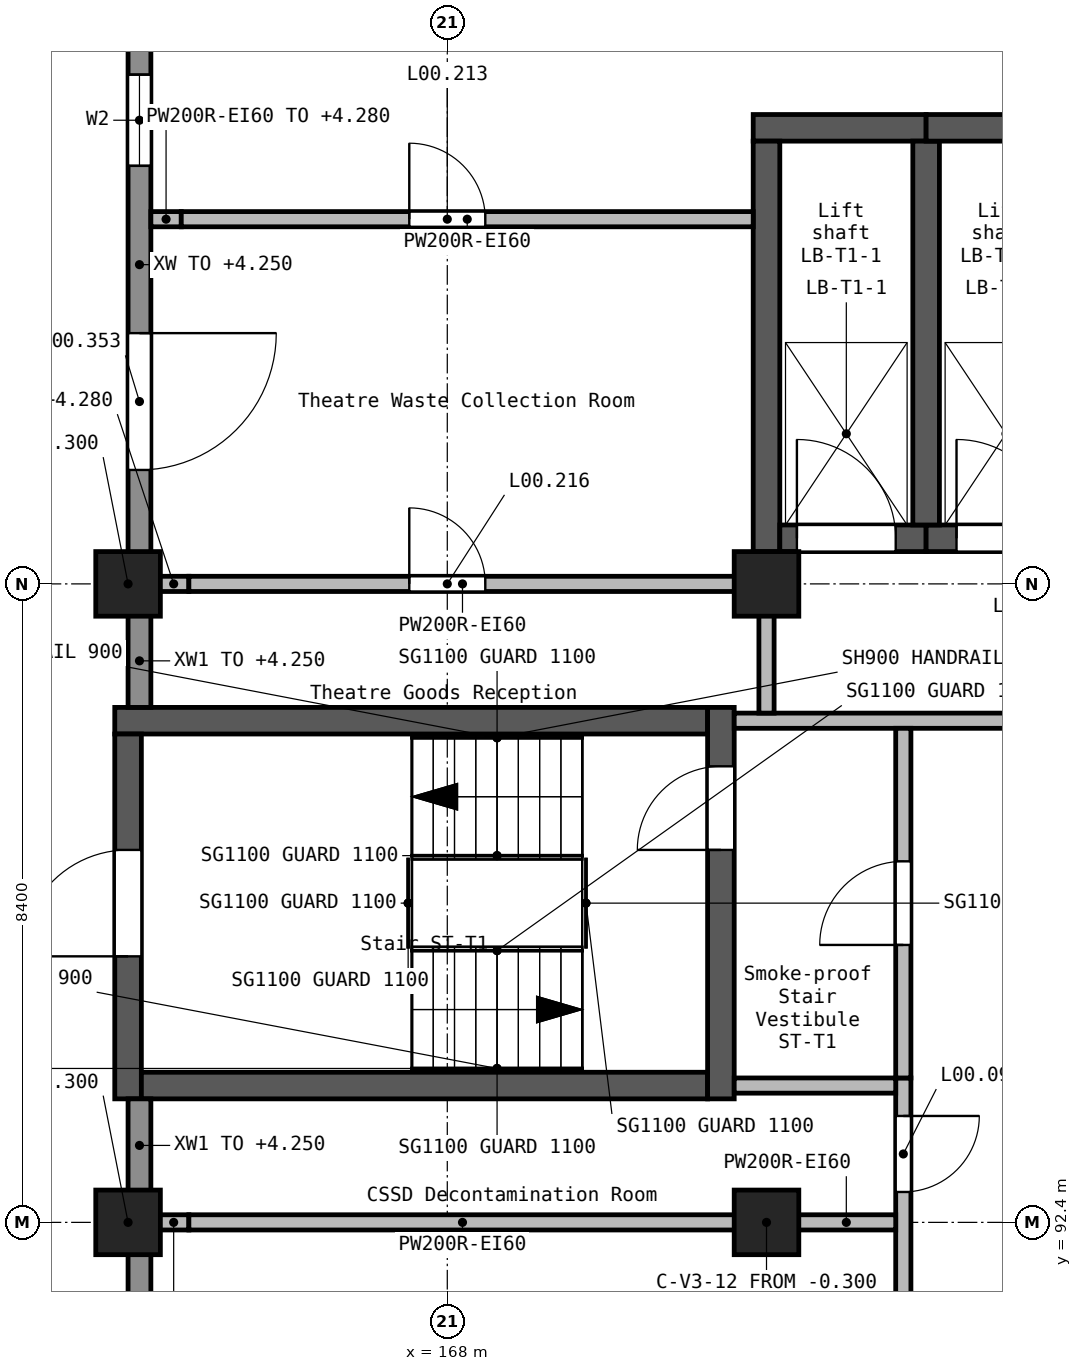
"""IFC4 building model, lengths in metres.
Left out: names, types, materials, properties, quantities, classifications, styles, units other than length and angle.
Written with IfcOpenShell. Run it as: python <this file> out.ifc"""

import sys

from ifc_helpers import new_model, si_unit, direction, frame, frame_2d, origin, origin_2d, place, context, subcontext, project, spatial, rectangle, extrude, element, fill, save


model = new_model("IFC4")
c1 = context("Model", 3, precision=1e-05, world=origin(), true_north=direction((0.0, 1.0)))
c2 = subcontext(c1, "Body", "Model", "MODEL_VIEW")
j1 = project(units=[si_unit("LENGTHUNIT", "METRE"), si_unit("PLANEANGLEUNIT", "RADIAN")], contexts=[c1])
p1 = place(None, origin())
s1 = spatial("IfcSite", under=j1, at=p1, CompositionType="ELEMENT")
p2 = place(p1, origin())
s2 = spatial("IfcBuilding", under=s1, at=p2, CompositionType="ELEMENT")
p3 = place(p2, origin())
s3 = spatial("IfcBuildingStorey", under=s2, at=p3, CompositionType="ELEMENT", Elevation=0.0)
for number, where, z_axis, x_axis in (
    (1, (163.8, 92.4, -0.3), (0.0, 0.0, 1.0), (1.0, 0.0, 0.0)),
    (2, (163.8, 100.8, -0.3), (0.0, 0.0, 1.0), (1.0, 0.0, 0.0)),
    (3, (172.2, 92.4, -0.3), (0.0, 0.0, 1.0), (1.0, 0.0, 0.0)),
    (4, (172.2, 100.8, -0.3), (0.0, 0.0, 1.0), (1.0, 0.0, 0.0)),
):
    element("IfcColumn", number, at=place(p3, frame(where, z_axis=z_axis, x_axis=x_axis)), inside=s3, PredefinedType="COLUMN", context=c2, shape_type="SweptSolid", body=[
        extrude(rectangle(XDim=0.85, YDim=0.85, at=origin_2d()), origin(), (0.0, 0.0, 1.0), 5.7),
    ])
p4 = place(p3, frame((163.625, 99.0, -0.3), z_axis=(0.0, 0.0, 1.0), x_axis=(1.0, 0.0, 0.0)))
e5 = element("IfcWall", 5, at=p4, inside=s3, PredefinedType="SHEAR", context=c2, shape_type="SweptSolid", body=[
    extrude(rectangle(XDim=7.8, YDim=0.35, at=frame_2d((3.9, 0.0))), origin(), (0.0, 0.0, 1.0), 5.7),
])
p5 = place(p3, frame((163.8, 94.025, -0.3), z_axis=(0.0, 0.0, 1.0), x_axis=(0.0, 1.0, 0.0)))
e6 = element("IfcWall", 6, at=p5, inside=s3, PredefinedType="SHEAR", context=c2, shape_type="SweptSolid", body=[
    extrude(rectangle(XDim=4.8, YDim=0.35, at=frame_2d((2.4, 0.0))), origin(), (0.0, 0.0, 1.0), 5.7),
])
p6 = place(p5, frame((1.875, 0.0, 0.3)))
e7 = element("IfcOpeningElement", 7, at=p6, cuts=e6, PredefinedType="OPENING", context=c2, shape_type="SweptSolid", body=[
    extrude(rectangle(XDim=1.4, YDim=2.1, at=frame_2d((0.7, 1.05))), frame((0.0, 0.185, 0.0), z_axis=(0.0, -1.0, 0.0), x_axis=(1.0, 0.0, 0.0)), (0.0, 0.0, 1.0), 0.37),
])
p7 = place(p3, frame((163.975, 94.2, -0.3), z_axis=(0.0, 0.0, 1.0), x_axis=(1.0, 0.0, 0.0)))
e8 = element("IfcWall", 8, at=p7, inside=s3, PredefinedType="SHEAR", context=c2, shape_type="SweptSolid", body=[
    extrude(rectangle(XDim=7.45, YDim=0.35, at=frame_2d((3.725, 0.0))), origin(), (0.0, 0.0, 1.0), 5.7),
])
p8 = place(p3, frame((171.6, 94.025, -0.3), z_axis=(0.0, 0.0, 1.0), x_axis=(0.0, 1.0, 0.0)))
e9 = element("IfcWall", 9, at=p8, inside=s3, PredefinedType="SHEAR", context=c2, shape_type="SweptSolid", body=[
    extrude(rectangle(XDim=5.15, YDim=0.35, at=frame_2d((2.575, 0.0))), origin(), (0.0, 0.0, 1.0), 5.7),
])
p9 = place(p8, frame((3.275, 0.0, 0.3)))
e10 = element("IfcOpeningElement", 10, at=p9, cuts=e9, PredefinedType="OPENING", context=c2, shape_type="SweptSolid", body=[
    extrude(rectangle(XDim=1.1, YDim=2.1, at=frame_2d((0.55, 1.05))), frame((0.0, 0.185, 0.0), z_axis=(0.0, -1.0, 0.0), x_axis=(1.0, 0.0, 0.0)), (0.0, 0.0, 1.0), 0.37),
])
p10 = place(p3, frame((172.025, 106.8, -0.3), z_axis=(0.0, 0.0, 1.0), x_axis=(1.0, 0.0, 0.0)))
e11 = element("IfcWall", 11, at=p10, inside=s3, PredefinedType="SHEAR", context=c2, shape_type="SweptSolid", body=[
    extrude(rectangle(XDim=2.275, YDim=0.35, at=frame_2d((1.138, 0.0))), origin(), (0.0, 0.0, 1.0), 5.7),
])
p11 = place(p3, frame((172.2, 101.225, -0.3), z_axis=(0.0, 0.0, 1.0), x_axis=(0.0, 1.0, 0.0)))
e12 = element("IfcWall", 12, at=p11, inside=s3, PredefinedType="SHEAR", context=c2, shape_type="SweptSolid", body=[
    extrude(rectangle(XDim=5.4, YDim=0.35, at=frame_2d((2.7, 0.0))), origin(), (0.0, 0.0, 1.0), 5.7),
])
p12 = place(p3, frame((172.375, 101.4, -0.3), z_axis=(0.0, 0.0, 1.0), x_axis=(1.0, 0.0, 0.0)))
e13 = element("IfcWall", 13, at=p12, inside=s3, PredefinedType="SHEAR", context=c2, shape_type="SweptSolid", body=[
    extrude(rectangle(XDim=1.925, YDim=0.35, at=frame_2d((0.962, 0.0))), origin(), (0.0, 0.0, 1.0), 5.7),
])
p13 = place(p12, frame((0.225, 0.0, 0.3)))
e14 = element("IfcOpeningElement", 14, at=p13, cuts=e13, PredefinedType="OPENING", context=c2, shape_type="SweptSolid", body=[
    extrude(rectangle(XDim=1.3, YDim=2.1, at=frame_2d((0.65, 1.05))), frame((0.0, 0.185, 0.0), z_axis=(0.0, -1.0, 0.0), x_axis=(1.0, 0.0, 0.0)), (0.0, 0.0, 1.0), 0.37),
])
p14 = place(p3, frame((174.3, 101.4, -0.3), z_axis=(0.0, 0.0, 1.0), x_axis=(1.0, 0.0, 0.0)))
e15 = element("IfcWall", 15, at=p14, inside=s3, PredefinedType="SHEAR", context=c2, shape_type="SweptSolid", body=[
    extrude(rectangle(XDim=2.1, YDim=0.35, at=frame_2d((1.05, 0.0))), origin(), (0.0, 0.0, 1.0), 5.7),
])
p15 = place(p14, frame((0.4, 0.0, 0.3)))
e16 = element("IfcOpeningElement", 16, at=p15, cuts=e15, PredefinedType="OPENING", context=c2, shape_type="SweptSolid", body=[
    extrude(rectangle(XDim=1.3, YDim=2.1, at=frame_2d((0.65, 1.05))), frame((0.0, 0.185, 0.0), z_axis=(0.0, -1.0, 0.0), x_axis=(1.0, 0.0, 0.0)), (0.0, 0.0, 1.0), 0.37),
])
p16 = place(p3, frame((174.3, 101.575, -0.3), z_axis=(0.0, 0.0, 1.0), x_axis=(0.0, 1.0, 0.0)))
e17 = element("IfcWall", 17, at=p16, inside=s3, PredefinedType="SHEAR", context=c2, shape_type="SweptSolid", body=[
    extrude(rectangle(XDim=5.05, YDim=0.35, at=frame_2d((2.525, 0.0))), origin(), (0.0, 0.0, 1.0), 5.7),
])
p17 = place(p3, frame((174.3, 106.8, -0.3), z_axis=(0.0, 0.0, 1.0), x_axis=(1.0, 0.0, 0.0)))
e18 = element("IfcWall", 18, at=p17, inside=s3, PredefinedType="SHEAR", context=c2, shape_type="SweptSolid", body=[
    extrude(rectangle(XDim=2.1, YDim=0.35, at=frame_2d((1.05, 0.0))), origin(), (0.0, 0.0, 1.0), 5.7),
])
p18 = place(p3, frame((163.95, 108.8, 0.0), z_axis=(0.0, 0.0, 1.0), x_axis=(0.0, -1.0, 0.0)))
e19 = element("IfcWall", 19, at=p18, inside=s3, PredefinedType="STANDARD", context=c2, shape_type="SweptSolid", body=[
    extrude(rectangle(XDim=7.6, YDim=0.3, at=frame_2d((3.8, 0.0))), origin(), (0.0, 0.0, 1.0), 4.25),
])
p19 = place(p18, frame((4.701, 0.0, 0.0)))
e20 = element("IfcOpeningElement", 20, at=p19, cuts=e19, PredefinedType="OPENING", context=c2, shape_type="SweptSolid", body=[
    extrude(rectangle(XDim=1.8, YDim=2.1, at=frame_2d((0.9, 1.05))), frame((0.0, 0.16, 0.0), z_axis=(0.0, -1.0, 0.0), x_axis=(1.0, 0.0, 0.0)), (0.0, 0.0, 1.0), 0.32),
])
p20 = place(p18, frame((1.3, 0.0, 1.2)))
e21 = element("IfcOpeningElement", 21, at=p20, cuts=e19, PredefinedType="OPENING", context=c2, shape_type="SweptSolid", body=[
    extrude(rectangle(XDim=1.2, YDim=1.2, at=frame_2d((0.6, 0.6))), frame((0.0, 0.16, 0.0), z_axis=(0.0, -1.0, 0.0), x_axis=(1.0, 0.0, 0.0)), (0.0, 0.0, 1.0), 0.32),
])
for number, where, z_axis, x_axis in (
    (22, (163.95, 100.4, 0.0), (0.0, 0.0, 1.0), (0.0, -1.0, 0.0)),
    (23, (163.95, 94.025, 0.0), (0.0, 0.0, 1.0), (0.0, -1.0, 0.0)),
):
    element("IfcWall", number, at=place(p3, frame(where, z_axis=z_axis, x_axis=x_axis)), inside=s3, PredefinedType="STANDARD", context=c2, shape_type="SweptSolid", body=[
        extrude(rectangle(XDim=1.225, YDim=0.3, at=frame_2d((0.612, 0.0))), origin(), (0.0, 0.0, 1.0), 4.25),
    ])
p21 = place(p3, frame((163.95, 92.0, 0.0), z_axis=(0.0, 0.0, 1.0), x_axis=(0.0, -1.0, 0.0)))
e24 = element("IfcWall", 24, at=p21, inside=s3, PredefinedType="STANDARD", context=c2, shape_type="SweptSolid", body=[
    extrude(rectangle(XDim=7.6, YDim=0.3, at=frame_2d((3.8, 0.0))), origin(), (0.0, 0.0, 1.0), 4.25),
])
p22 = place(p21, frame((1.3, 0.0, 1.2)))
e25 = element("IfcOpeningElement", 25, at=p22, cuts=e24, PredefinedType="OPENING", context=c2, shape_type="SweptSolid", body=[
    extrude(rectangle(XDim=1.2, YDim=1.2, at=frame_2d((0.6, 0.6))), frame((0.0, 0.16, 0.0), z_axis=(0.0, -1.0, 0.0), x_axis=(1.0, 0.0, 0.0)), (0.0, 0.0, 1.0), 0.32),
])
p23 = place(p21, frame((5.75, 0.0, 1.2)))
e26 = element("IfcOpeningElement", 26, at=p23, cuts=e24, PredefinedType="OPENING", context=c2, shape_type="SweptSolid", body=[
    extrude(rectangle(XDim=1.2, YDim=1.2, at=frame_2d((0.6, 0.6))), frame((0.0, 0.16, 0.0), z_axis=(0.0, -1.0, 0.0), x_axis=(1.0, 0.0, 0.0)), (0.0, 0.0, 1.0), 0.32),
])
p24 = place(p3, frame((174.0, 94.3, 0.0), z_axis=(0.0, 0.0, 1.0), x_axis=(0.0, -1.0, 0.0)))
e27 = element("IfcWall", 27, at=p24, inside=s3, PredefinedType="SOLIDWALL", context=c2, shape_type="SweptSolid", body=[
    extrude(rectangle(XDim=10.4, YDim=0.2, at=frame_2d((5.2, 0.0))), origin(), (0.0, 0.0, 1.0), 5.05),
])
p25 = place(p24, frame((0.5, 0.0, 0.0)))
e28 = element("IfcOpeningElement", 28, at=p25, cuts=e27, PredefinedType="OPENING", context=c2, shape_type="SweptSolid", body=[
    extrude(rectangle(XDim=1.0, YDim=2.1, at=frame_2d((0.5, 1.05))), frame((0.0, 0.11, 0.0), z_axis=(0.0, -1.0, 0.0), x_axis=(1.0, 0.0, 0.0)), (0.0, 0.0, 1.0), 0.22),
])
p26 = place(p24, frame((4.4, 0.0, 0.0)))
e29 = element("IfcOpeningElement", 29, at=p26, cuts=e27, PredefinedType="OPENING", context=c2, shape_type="SweptSolid", body=[
    extrude(rectangle(XDim=1.0, YDim=2.1, at=frame_2d((0.5, 1.05))), frame((0.0, 0.11, 0.0), z_axis=(0.0, -1.0, 0.0), x_axis=(1.0, 0.0, 0.0)), (0.0, 0.0, 1.0), 0.22),
])
p27 = place(p24, frame((8.6, 0.0, 0.0)))
e30 = element("IfcOpeningElement", 30, at=p27, cuts=e27, PredefinedType="OPENING", context=c2, shape_type="SweptSolid", body=[
    extrude(rectangle(XDim=1.0, YDim=2.1, at=frame_2d((0.5, 1.05))), frame((0.0, 0.11, 0.0), z_axis=(0.0, -1.0, 0.0), x_axis=(1.0, 0.0, 0.0)), (0.0, 0.0, 1.0), 0.22),
])
p28 = place(p3, frame((164.2, 92.4, 0.0), z_axis=(0.0, 0.0, 1.0), x_axis=(1.0, 0.0, 0.0)))
e31 = element("IfcWall", 31, at=p28, inside=s3, PredefinedType="SOLIDWALL", context=c2, shape_type="SweptSolid", body=[
    extrude(rectangle(XDim=0.4, YDim=0.2, at=frame_2d((0.2, 0.0))), origin(), (0.0, 0.0, 1.0), 4.28),
])
p29 = place(p3, frame((164.6, 92.4, 0.0), z_axis=(0.0, 0.0, 1.0), x_axis=(1.0, 0.0, 0.0)))
e32 = element("IfcWall", 32, at=p29, inside=s3, PredefinedType="SOLIDWALL", context=c2, shape_type="SweptSolid", body=[
    extrude(rectangle(XDim=7.2, YDim=0.2, at=frame_2d((3.6, 0.0))), origin(), (0.0, 0.0, 1.0), 5.05),
])
p30 = place(p3, frame((172.6, 92.4, 0.0), z_axis=(0.0, 0.0, 1.0), x_axis=(1.0, 0.0, 0.0)))
e33 = element("IfcWall", 33, at=p30, inside=s3, PredefinedType="SOLIDWALL", context=c2, shape_type="SweptSolid", body=[
    extrude(rectangle(XDim=1.3, YDim=0.2, at=frame_2d((0.65, 0.0))), origin(), (0.0, 0.0, 1.0), 5.05),
])
p31 = place(p3, frame((180.7, 99.0, 0.0), z_axis=(0.0, 0.0, 1.0), x_axis=(-1.0, 0.0, 0.0)))
e34 = element("IfcWall", 34, at=p31, inside=s3, PredefinedType="SOLIDWALL", context=c2, shape_type="SweptSolid", body=[
    extrude(rectangle(XDim=8.925, YDim=0.2, at=frame_2d((4.462, 0.0))), origin(), (0.0, 0.0, 1.0), 5.05),
])
p32 = place(p31, frame((2.5, 0.0, 0.0)))
e35 = element("IfcOpeningElement", 35, at=p32, cuts=e34, PredefinedType="OPENING", context=c2, shape_type="SweptSolid", body=[
    extrude(rectangle(XDim=1.8, YDim=2.1, at=frame_2d((0.9, 1.05))), frame((0.0, 0.11, 0.0), z_axis=(0.0, -1.0, 0.0), x_axis=(1.0, 0.0, 0.0)), (0.0, 0.0, 1.0), 0.22),
])
p33 = place(p3, frame((172.2, 99.1, 0.0), z_axis=(0.0, 0.0, 1.0), x_axis=(0.0, 1.0, 0.0)))
e36 = element("IfcWall", 36, at=p33, inside=s3, PredefinedType="SOLIDWALL", context=c2, shape_type="SweptSolid", body=[
    extrude(rectangle(XDim=1.3, YDim=0.2, at=frame_2d((0.65, 0.0))), origin(), (0.0, 0.0, 1.0), 5.05),
])
p34 = place(p3, frame((164.2, 100.8, 0.0), z_axis=(0.0, 0.0, 1.0), x_axis=(1.0, 0.0, 0.0)))
e37 = element("IfcWall", 37, at=p34, inside=s3, PredefinedType="SOLIDWALL", context=c2, shape_type="SweptSolid", body=[
    extrude(rectangle(XDim=0.4, YDim=0.2, at=frame_2d((0.2, 0.0))), origin(), (0.0, 0.0, 1.0), 4.28),
])
p35 = place(p3, frame((164.6, 100.8, 0.0), z_axis=(0.0, 0.0, 1.0), x_axis=(1.0, 0.0, 0.0)))
e38 = element("IfcWall", 38, at=p35, inside=s3, PredefinedType="SOLIDWALL", context=c2, shape_type="SweptSolid", body=[
    extrude(rectangle(XDim=7.2, YDim=0.2, at=frame_2d((3.6, 0.0))), origin(), (0.0, 0.0, 1.0), 5.05),
])
p36 = place(p35, frame((2.9, 0.0, 0.0)))
e39 = element("IfcOpeningElement", 39, at=p36, cuts=e38, PredefinedType="OPENING", context=c2, shape_type="SweptSolid", body=[
    extrude(rectangle(XDim=1.0, YDim=2.1, at=frame_2d((0.5, 1.05))), frame((0.0, 0.11, 0.0), z_axis=(0.0, -1.0, 0.0), x_axis=(1.0, 0.0, 0.0)), (0.0, 0.0, 1.0), 0.22),
])
p37 = place(p3, frame((164.1, 105.598, 0.0), z_axis=(0.0, 0.0, 1.0), x_axis=(1.0, 0.0, 0.0)))
e40 = element("IfcWall", 40, at=p37, inside=s3, PredefinedType="SOLIDWALL", context=c2, shape_type="SweptSolid", body=[
    extrude(rectangle(XDim=0.4, YDim=0.2, at=frame_2d((0.2, 0.0))), origin(), (0.0, 0.0, 1.0), 4.28),
])
p38 = place(p3, frame((164.5, 105.598, 0.0), z_axis=(0.0, 0.0, 1.0), x_axis=(1.0, 0.0, 0.0)))
e41 = element("IfcWall", 41, at=p38, inside=s3, PredefinedType="SOLIDWALL", context=c2, shape_type="SweptSolid", body=[
    extrude(rectangle(XDim=7.525, YDim=0.2, at=frame_2d((3.762, 0.0))), origin(), (0.0, 0.0, 1.0), 5.05),
])
p39 = place(p38, frame((3.0, 0.0, 0.0)))
e42 = element("IfcOpeningElement", 42, at=p39, cuts=e41, PredefinedType="OPENING", context=c2, shape_type="SweptSolid", body=[
    extrude(rectangle(XDim=1.0, YDim=2.1, at=frame_2d((0.5, 1.05))), frame((0.0, 0.11, 0.0), z_axis=(0.0, -1.0, 0.0), x_axis=(1.0, 0.0, 0.0)), (0.0, 0.0, 1.0), 0.22),
])
p40 = place(p3, frame((174.0, 94.3, 0.0), z_axis=(0.0, 0.0, 1.0), x_axis=(0.0, 1.0, 0.0)))
e43 = element("IfcWall", 43, at=p40, inside=s3, PredefinedType="SOLIDWALL", context=c2, shape_type="SweptSolid", body=[
    extrude(rectangle(XDim=4.6, YDim=0.2, at=frame_2d((2.3, 0.0))), origin(), (0.0, 0.0, 1.0), 5.05),
])
p41 = place(p40, frame((1.75, 0.0, 0.0)))
e44 = element("IfcOpeningElement", 44, at=p41, cuts=e43, PredefinedType="OPENING", context=c2, shape_type="SweptSolid", body=[
    extrude(rectangle(XDim=1.1, YDim=2.1, at=frame_2d((0.55, 1.05))), frame((0.0, 0.11, 0.0), z_axis=(0.0, -1.0, 0.0), x_axis=(1.0, 0.0, 0.0)), (0.0, 0.0, 1.0), 0.22),
])
p42 = place(p3, frame((171.775, 94.2, 0.0), z_axis=(0.0, 0.0, 1.0), x_axis=(1.0, 0.0, 0.0)))
e45 = element("IfcWall", 45, at=p42, inside=s3, PredefinedType="SOLIDWALL", context=c2, shape_type="SweptSolid", body=[
    extrude(rectangle(XDim=2.125, YDim=0.2, at=frame_2d((1.062, 0.0))), origin(), (0.0, 0.0, 1.0), 5.05),
])
p43 = place(p6, origin())
e46 = element("IfcDoor", 46, at=p43, inside=s3, OperationType="SINGLE_SWING_LEFT", PredefinedType="DOOR", context=c2, shape_type="SweptSolid", body=[
    extrude(rectangle(XDim=1.4, YDim=2.1, at=frame_2d((0.7, 1.05))), frame((0.0, 0.025, 0.0), z_axis=(0.0, -1.0, 0.0), x_axis=(1.0, 0.0, 0.0)), (0.0, 0.0, 1.0), 0.05),
])
fill(e7, e46)
p44 = place(p19, frame((1.8, 0.0, 0.0), z_axis=(0.0, 0.0, 1.0), x_axis=(-1.0, 0.0, 0.0)))
e47 = element("IfcDoor", 47, at=p44, inside=s3, OperationType="SINGLE_SWING_LEFT", PredefinedType="DOOR", context=c2, shape_type="SweptSolid", body=[
    extrude(rectangle(XDim=1.8, YDim=2.1, at=frame_2d((0.9, 1.05))), frame((0.0, 0.025, 0.0), z_axis=(0.0, -1.0, 0.0), x_axis=(1.0, 0.0, 0.0)), (0.0, 0.0, 1.0), 0.05),
])
fill(e20, e47)
p45 = place(p20, origin())
e48 = element("IfcWindow", 48, at=p45, inside=s3, PartitioningType="SINGLE_PANEL", PredefinedType="WINDOW", context=c2, shape_type="SweptSolid", body=[
    extrude(rectangle(XDim=1.2, YDim=1.2, at=frame_2d((0.6, 0.6))), frame((0.0, 0.03, 0.0), z_axis=(0.0, -1.0, 0.0), x_axis=(1.0, 0.0, 0.0)), (0.0, 0.0, 1.0), 0.06),
])
fill(e21, e48)
p46 = place(p13, origin())
e49 = element("IfcDoor", 49, at=p46, inside=s3, OperationType="DOUBLE_DOOR_SLIDING", PredefinedType="DOOR", context=c2, shape_type="SweptSolid", body=[
    extrude(rectangle(XDim=1.3, YDim=2.1, at=frame_2d((0.65, 1.05))), frame((0.0, 0.025, 0.0), z_axis=(0.0, -1.0, 0.0), x_axis=(1.0, 0.0, 0.0)), (0.0, 0.0, 1.0), 0.05),
])
fill(e14, e49)
p47 = place(p15, origin())
e50 = element("IfcDoor", 50, at=p47, inside=s3, OperationType="DOUBLE_DOOR_SLIDING", PredefinedType="DOOR", context=c2, shape_type="SweptSolid", body=[
    extrude(rectangle(XDim=1.3, YDim=2.1, at=frame_2d((0.65, 1.05))), frame((0.0, 0.025, 0.0), z_axis=(0.0, -1.0, 0.0), x_axis=(1.0, 0.0, 0.0)), (0.0, 0.0, 1.0), 0.05),
])
fill(e16, e50)
p48 = place(p9, origin())
e51 = element("IfcDoor", 51, at=p48, inside=s3, OperationType="SINGLE_SWING_RIGHT", PredefinedType="DOOR", context=c2, shape_type="SweptSolid", body=[
    extrude(rectangle(XDim=1.1, YDim=2.1, at=frame_2d((0.55, 1.05))), frame((0.0, 0.025, 0.0), z_axis=(0.0, -1.0, 0.0), x_axis=(1.0, 0.0, 0.0)), (0.0, 0.0, 1.0), 0.05),
])
fill(e10, e51)
p49 = place(p41, origin())
e52 = element("IfcDoor", 52, at=p49, inside=s3, OperationType="SINGLE_SWING_LEFT", PredefinedType="DOOR", context=c2, shape_type="SweptSolid", body=[
    extrude(rectangle(XDim=1.1, YDim=2.1, at=frame_2d((0.55, 1.05))), frame((0.0, 0.025, 0.0), z_axis=(0.0, -1.0, 0.0), x_axis=(1.0, 0.0, 0.0)), (0.0, 0.0, 1.0), 0.05),
])
fill(e44, e52)
p50 = place(p25, frame((1.0, 0.0, 0.0), z_axis=(0.0, 0.0, 1.0), x_axis=(-1.0, 0.0, 0.0)))
e53 = element("IfcDoor", 53, at=p50, inside=s3, OperationType="SINGLE_SWING_RIGHT", PredefinedType="DOOR", context=c2, shape_type="SweptSolid", body=[
    extrude(rectangle(XDim=1.0, YDim=2.1, at=frame_2d((0.5, 1.05))), frame((0.0, 0.025, 0.0), z_axis=(0.0, -1.0, 0.0), x_axis=(1.0, 0.0, 0.0)), (0.0, 0.0, 1.0), 0.05),
])
fill(e28, e53)
p51 = place(p39, frame((1.0, 0.0, 0.0), z_axis=(0.0, 0.0, 1.0), x_axis=(-1.0, 0.0, 0.0)))
e54 = element("IfcDoor", 54, at=p51, inside=s3, OperationType="SINGLE_SWING_RIGHT", PredefinedType="DOOR", context=c2, shape_type="SweptSolid", body=[
    extrude(rectangle(XDim=1.0, YDim=2.1, at=frame_2d((0.5, 1.05))), frame((0.0, 0.025, 0.0), z_axis=(0.0, -1.0, 0.0), x_axis=(1.0, 0.0, 0.0)), (0.0, 0.0, 1.0), 0.05),
])
fill(e42, e54)
p52 = place(p36, frame((1.0, 0.0, 0.0), z_axis=(0.0, 0.0, 1.0), x_axis=(-1.0, 0.0, 0.0)))
e55 = element("IfcDoor", 55, at=p52, inside=s3, OperationType="SINGLE_SWING_RIGHT", PredefinedType="DOOR", context=c2, shape_type="SweptSolid", body=[
    extrude(rectangle(XDim=1.0, YDim=2.1, at=frame_2d((0.5, 1.05))), frame((0.0, 0.025, 0.0), z_axis=(0.0, -1.0, 0.0), x_axis=(1.0, 0.0, 0.0)), (0.0, 0.0, 1.0), 0.05),
])
fill(e39, e55)
save(model, sys.argv[1])
